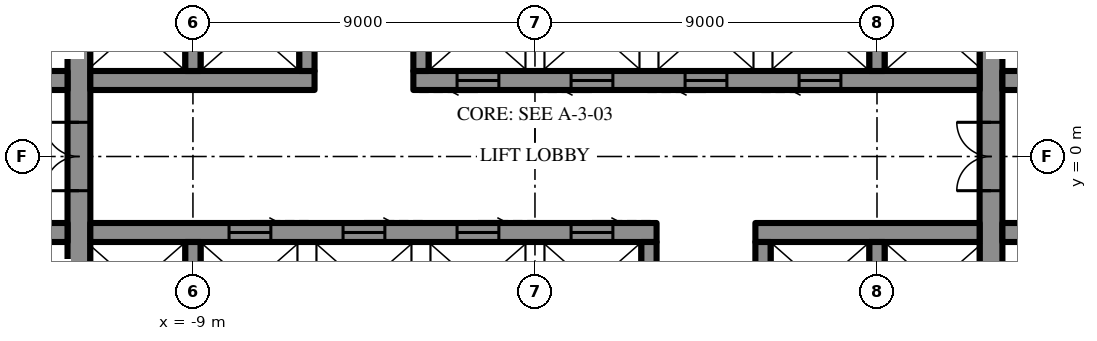
"""IFC4 building model, lengths in metres.
Left out: names, types, materials, properties, quantities, classifications, styles, units other than length and angle.
Written with IfcOpenShell. Run it as: python <this file> out.ifc"""

import sys

from ifc_helpers import new_model, si_unit, direction, frame, frame_2d, origin, place, context, subcontext, project, spatial, rectangle, extrude, element, fill, save


model = new_model("IFC4")
c1 = context("Model", 3, precision=1e-05, world=origin(), true_north=direction((0.0, 1.0)))
c2 = subcontext(c1, "Body", "Model", "MODEL_VIEW")
j1 = project(units=[si_unit("LENGTHUNIT", "METRE"), si_unit("PLANEANGLEUNIT", "RADIAN")], contexts=[c1])
p1 = place(None, origin())
s1 = spatial("IfcSite", under=j1, at=p1, CompositionType="ELEMENT")
p2 = place(p1, origin())
s2 = spatial("IfcBuilding", under=s1, at=p2, CompositionType="ELEMENT")
p3 = place(p2, frame((0.0, 0.0, 291.1)))
s3 = spatial("IfcBuildingStorey", under=s2, at=p3, CompositionType="ELEMENT", Elevation=291.1)
p4 = place(p3, frame((12.0, -10.7, 0.0), z_axis=(0.0, 0.0, 1.0), x_axis=(0.0, 1.0, 0.0)))
e1 = element("IfcWall", 1, at=p4, inside=s3, PredefinedType="SHEAR", context=c2, shape_type="SweptSolid", body=[
    extrude(rectangle(XDim=21.4, YDim=0.6, at=frame_2d((10.7, 0.0))), origin(), (0.0, 0.0, 1.0), 4.2),
])
p5 = place(p4, frame((9.8, 0.0, 0.0)))
e2 = element("IfcOpeningElement", 2, at=p5, cuts=e1, PredefinedType="OPENING", context=c2, shape_type="SweptSolid", body=[
    extrude(rectangle(XDim=1.8, YDim=2.4, at=frame_2d((0.9, 1.2))), frame((0.0, 0.31, 0.0), z_axis=(0.0, -1.0, 0.0), x_axis=(1.0, 0.0, 0.0)), (0.0, 0.0, 1.0), 0.62),
])
p6 = place(p3, frame((-12.0, -10.7, 0.0), z_axis=(0.0, 0.0, 1.0), x_axis=(0.0, 1.0, 0.0)))
e3 = element("IfcWall", 3, at=p6, inside=s3, PredefinedType="SHEAR", context=c2, shape_type="SweptSolid", body=[
    extrude(rectangle(XDim=21.4, YDim=0.6, at=frame_2d((10.7, 0.0))), origin(), (0.0, 0.0, 1.0), 4.2),
])
p7 = place(p6, frame((9.8, 0.0, 0.0)))
e4 = element("IfcOpeningElement", 4, at=p7, cuts=e3, PredefinedType="OPENING", context=c2, shape_type="SweptSolid", body=[
    extrude(rectangle(XDim=1.8, YDim=2.4, at=frame_2d((0.9, 1.2))), frame((0.0, 0.31, 0.0), z_axis=(0.0, -1.0, 0.0), x_axis=(1.0, 0.0, 0.0)), (0.0, 0.0, 1.0), 0.62),
])
p8 = place(p3, frame((-14.5, 2.0, 0.0), z_axis=(0.0, 0.0, 1.0), x_axis=(1.0, 0.0, 0.0)))
e5 = element("IfcWall", 5, at=p8, inside=s3, PredefinedType="SHEAR", context=c2, shape_type="SweptSolid", body=[
    extrude(rectangle(XDim=2.2, YDim=0.5, at=frame_2d((1.1, 0.0))), origin(), (0.0, 0.0, 1.0), 4.2),
])
p9 = place(p8, frame((0.5, 0.0, 0.0)))
e6 = element("IfcOpeningElement", 6, at=p9, cuts=e5, PredefinedType="OPENING", context=c2, shape_type="SweptSolid", body=[
    extrude(rectangle(XDim=0.9, YDim=2.2, at=frame_2d((0.45, 1.1))), frame((0.0, 0.26, 0.0), z_axis=(0.0, -1.0, 0.0), x_axis=(1.0, 0.0, 0.0)), (0.0, 0.0, 1.0), 0.52),
])
p10 = place(p3, frame((-11.7, 2.0, 0.0), z_axis=(0.0, 0.0, 1.0), x_axis=(1.0, 0.0, 0.0)))
e7 = element("IfcWall", 7, at=p10, inside=s3, PredefinedType="SHEAR", context=c2, shape_type="SweptSolid", body=[
    extrude(rectangle(XDim=5.9, YDim=0.5, at=frame_2d((2.95, 0.0))), origin(), (0.0, 0.0, 1.0), 4.2),
])
p11 = place(p3, frame((-3.2, 2.0, 0.0), z_axis=(0.0, 0.0, 1.0), x_axis=(1.0, 0.0, 0.0)))
e8 = element("IfcWall", 8, at=p11, inside=s3, PredefinedType="SHEAR", context=c2, shape_type="SweptSolid", body=[
    extrude(rectangle(XDim=14.9, YDim=0.5, at=frame_2d((7.45, 0.0))), origin(), (0.0, 0.0, 1.0), 4.2),
])
p12 = place(p11, frame((1.15, 0.0, 0.0)))
e9 = element("IfcOpeningElement", 9, at=p12, cuts=e8, PredefinedType="OPENING", context=c2, shape_type="SweptSolid", body=[
    extrude(rectangle(XDim=1.1, YDim=2.2, at=frame_2d((0.55, 1.1))), frame((0.0, 0.26, 0.0), z_axis=(0.0, -1.0, 0.0), x_axis=(1.0, 0.0, 0.0)), (0.0, 0.0, 1.0), 0.52),
])
p13 = place(p11, frame((4.15, 0.0, 0.0)))
e10 = element("IfcOpeningElement", 10, at=p13, cuts=e8, PredefinedType="OPENING", context=c2, shape_type="SweptSolid", body=[
    extrude(rectangle(XDim=1.1, YDim=2.2, at=frame_2d((0.55, 1.1))), frame((0.0, 0.26, 0.0), z_axis=(0.0, -1.0, 0.0), x_axis=(1.0, 0.0, 0.0)), (0.0, 0.0, 1.0), 0.52),
])
p14 = place(p11, frame((7.15, 0.0, 0.0)))
e11 = element("IfcOpeningElement", 11, at=p14, cuts=e8, PredefinedType="OPENING", context=c2, shape_type="SweptSolid", body=[
    extrude(rectangle(XDim=1.1, YDim=2.2, at=frame_2d((0.55, 1.1))), frame((0.0, 0.26, 0.0), z_axis=(0.0, -1.0, 0.0), x_axis=(1.0, 0.0, 0.0)), (0.0, 0.0, 1.0), 0.52),
])
p15 = place(p11, frame((10.15, 0.0, 0.0)))
e12 = element("IfcOpeningElement", 12, at=p15, cuts=e8, PredefinedType="OPENING", context=c2, shape_type="SweptSolid", body=[
    extrude(rectangle(XDim=1.1, YDim=2.2, at=frame_2d((0.55, 1.1))), frame((0.0, 0.26, 0.0), z_axis=(0.0, -1.0, 0.0), x_axis=(1.0, 0.0, 0.0)), (0.0, 0.0, 1.0), 0.52),
])
p16 = place(p3, frame((12.3, 2.0, 0.0), z_axis=(0.0, 0.0, 1.0), x_axis=(1.0, 0.0, 0.0)))
e13 = element("IfcWall", 13, at=p16, inside=s3, PredefinedType="SHEAR", context=c2, shape_type="SweptSolid", body=[
    extrude(rectangle(XDim=2.2, YDim=0.5, at=frame_2d((1.1, 0.0))), origin(), (0.0, 0.0, 1.0), 4.2),
])
p17 = place(p16, frame((0.8, 0.0, 0.0)))
e14 = element("IfcOpeningElement", 14, at=p17, cuts=e13, PredefinedType="OPENING", context=c2, shape_type="SweptSolid", body=[
    extrude(rectangle(XDim=0.9, YDim=2.2, at=frame_2d((0.45, 1.1))), frame((0.0, 0.26, 0.0), z_axis=(0.0, -1.0, 0.0), x_axis=(1.0, 0.0, 0.0)), (0.0, 0.0, 1.0), 0.52),
])
for number, where, z_axis, x_axis in (
    (15, (-9.0, 2.25, 0.0), (0.0, 0.0, 1.0), (0.0, 1.0, 0.0)),
    (16, (-6.0, 2.25, 0.0), (0.0, 0.0, 1.0), (0.0, 1.0, 0.0)),
    (17, (-3.0, 2.25, 0.0), (0.0, 0.0, 1.0), (0.0, 1.0, 0.0)),
    (18, (9.0, 2.25, 0.0), (0.0, 0.0, 1.0), (0.0, 1.0, 0.0)),
):
    element("IfcWall", number, at=place(p3, frame(where, z_axis=z_axis, x_axis=x_axis)), inside=s3, PredefinedType="SHEAR", context=c2, shape_type="SweptSolid", body=[
        extrude(rectangle(XDim=2.3, YDim=0.4, at=frame_2d((1.15, 0.0))), origin(), (0.0, 0.0, 1.0), 4.2),
    ])
p18 = place(p3, frame((14.5, -2.0, 0.0), z_axis=(0.0, 0.0, 1.0), x_axis=(-1.0, 0.0, 0.0)))
e19 = element("IfcWall", 19, at=p18, inside=s3, PredefinedType="SHEAR", context=c2, shape_type="SweptSolid", body=[
    extrude(rectangle(XDim=2.2, YDim=0.5, at=frame_2d((1.1, 0.0))), origin(), (0.0, 0.0, 1.0), 4.2),
])
p19 = place(p18, frame((0.5, 0.0, 0.0)))
e20 = element("IfcOpeningElement", 20, at=p19, cuts=e19, PredefinedType="OPENING", context=c2, shape_type="SweptSolid", body=[
    extrude(rectangle(XDim=0.9, YDim=2.2, at=frame_2d((0.45, 1.1))), frame((0.0, 0.26, 0.0), z_axis=(0.0, -1.0, 0.0), x_axis=(1.0, 0.0, 0.0)), (0.0, 0.0, 1.0), 0.52),
])
p20 = place(p3, frame((11.7, -2.0, 0.0), z_axis=(0.0, 0.0, 1.0), x_axis=(-1.0, 0.0, 0.0)))
e21 = element("IfcWall", 21, at=p20, inside=s3, PredefinedType="SHEAR", context=c2, shape_type="SweptSolid", body=[
    extrude(rectangle(XDim=5.9, YDim=0.5, at=frame_2d((2.95, 0.0))), origin(), (0.0, 0.0, 1.0), 4.2),
])
p21 = place(p3, frame((3.2, -2.0, 0.0), z_axis=(0.0, 0.0, 1.0), x_axis=(-1.0, 0.0, 0.0)))
e22 = element("IfcWall", 22, at=p21, inside=s3, PredefinedType="SHEAR", context=c2, shape_type="SweptSolid", body=[
    extrude(rectangle(XDim=14.9, YDim=0.5, at=frame_2d((7.45, 0.0))), origin(), (0.0, 0.0, 1.0), 4.2),
])
p22 = place(p21, frame((1.15, 0.0, 0.0)))
e23 = element("IfcOpeningElement", 23, at=p22, cuts=e22, PredefinedType="OPENING", context=c2, shape_type="SweptSolid", body=[
    extrude(rectangle(XDim=1.1, YDim=2.2, at=frame_2d((0.55, 1.1))), frame((0.0, 0.26, 0.0), z_axis=(0.0, -1.0, 0.0), x_axis=(1.0, 0.0, 0.0)), (0.0, 0.0, 1.0), 0.52),
])
p23 = place(p21, frame((4.15, 0.0, 0.0)))
e24 = element("IfcOpeningElement", 24, at=p23, cuts=e22, PredefinedType="OPENING", context=c2, shape_type="SweptSolid", body=[
    extrude(rectangle(XDim=1.1, YDim=2.2, at=frame_2d((0.55, 1.1))), frame((0.0, 0.26, 0.0), z_axis=(0.0, -1.0, 0.0), x_axis=(1.0, 0.0, 0.0)), (0.0, 0.0, 1.0), 0.52),
])
p24 = place(p21, frame((7.15, 0.0, 0.0)))
e25 = element("IfcOpeningElement", 25, at=p24, cuts=e22, PredefinedType="OPENING", context=c2, shape_type="SweptSolid", body=[
    extrude(rectangle(XDim=1.1, YDim=2.2, at=frame_2d((0.55, 1.1))), frame((0.0, 0.26, 0.0), z_axis=(0.0, -1.0, 0.0), x_axis=(1.0, 0.0, 0.0)), (0.0, 0.0, 1.0), 0.52),
])
p25 = place(p21, frame((10.15, 0.0, 0.0)))
e26 = element("IfcOpeningElement", 26, at=p25, cuts=e22, PredefinedType="OPENING", context=c2, shape_type="SweptSolid", body=[
    extrude(rectangle(XDim=1.1, YDim=2.2, at=frame_2d((0.55, 1.1))), frame((0.0, 0.26, 0.0), z_axis=(0.0, -1.0, 0.0), x_axis=(1.0, 0.0, 0.0)), (0.0, 0.0, 1.0), 0.52),
])
p26 = place(p3, frame((-12.3, -2.0, 0.0), z_axis=(0.0, 0.0, 1.0), x_axis=(-1.0, 0.0, 0.0)))
e27 = element("IfcWall", 27, at=p26, inside=s3, PredefinedType="SHEAR", context=c2, shape_type="SweptSolid", body=[
    extrude(rectangle(XDim=2.2, YDim=0.5, at=frame_2d((1.1, 0.0))), origin(), (0.0, 0.0, 1.0), 4.2),
])
p27 = place(p26, frame((0.8, 0.0, 0.0)))
e28 = element("IfcOpeningElement", 28, at=p27, cuts=e27, PredefinedType="OPENING", context=c2, shape_type="SweptSolid", body=[
    extrude(rectangle(XDim=0.9, YDim=2.2, at=frame_2d((0.45, 1.1))), frame((0.0, 0.26, 0.0), z_axis=(0.0, -1.0, 0.0), x_axis=(1.0, 0.0, 0.0)), (0.0, 0.0, 1.0), 0.52),
])
for number, where, z_axis, x_axis in (
    (29, (9.0, -2.25, 0.0), (0.0, 0.0, 1.0), (0.0, -1.0, 0.0)),
    (30, (6.0, -2.25, 0.0), (0.0, 0.0, 1.0), (0.0, -1.0, 0.0)),
    (31, (3.0, -2.25, 0.0), (0.0, 0.0, 1.0), (0.0, -1.0, 0.0)),
    (32, (-9.0, -2.25, 0.0), (0.0, 0.0, 1.0), (0.0, -1.0, 0.0)),
):
    element("IfcWall", number, at=place(p3, frame(where, z_axis=z_axis, x_axis=x_axis)), inside=s3, PredefinedType="SHEAR", context=c2, shape_type="SweptSolid", body=[
        extrude(rectangle(XDim=2.3, YDim=0.4, at=frame_2d((1.15, 0.0))), origin(), (0.0, 0.0, 1.0), 4.2),
    ])
p28 = place(p5, origin())
e33 = element("IfcDoor", 33, at=p28, inside=s3, OperationType="DOUBLE_DOOR_SINGLE_SWING", PredefinedType="DOOR", context=c2, shape_type="SweptSolid", body=[
    extrude(rectangle(XDim=1.8, YDim=2.4, at=frame_2d((0.9, 1.2))), frame((0.0, 0.025, 0.0), z_axis=(0.0, -1.0, 0.0), x_axis=(1.0, 0.0, 0.0)), (0.0, 0.0, 1.0), 0.05),
])
fill(e2, e33)
p29 = place(p7, origin())
e34 = element("IfcDoor", 34, at=p29, inside=s3, OperationType="DOUBLE_DOOR_SINGLE_SWING", PredefinedType="DOOR", context=c2, shape_type="SweptSolid", body=[
    extrude(rectangle(XDim=1.8, YDim=2.4, at=frame_2d((0.9, 1.2))), frame((0.0, 0.025, 0.0), z_axis=(0.0, -1.0, 0.0), x_axis=(1.0, 0.0, 0.0)), (0.0, 0.0, 1.0), 0.05),
])
fill(e4, e34)
p30 = place(p12, frame((1.1, 0.0, 0.0), z_axis=(0.0, 0.0, 1.0), x_axis=(-1.0, 0.0, 0.0)))
e35 = element("IfcDoor", 35, at=p30, inside=s3, OperationType="SLIDING_TO_LEFT", PredefinedType="DOOR", context=c2, shape_type="SweptSolid", body=[
    extrude(rectangle(XDim=1.1, YDim=2.2, at=frame_2d((0.55, 1.1))), frame((0.0, 0.025, 0.0), z_axis=(0.0, -1.0, 0.0), x_axis=(1.0, 0.0, 0.0)), (0.0, 0.0, 1.0), 0.05),
])
fill(e9, e35)
p31 = place(p13, frame((1.1, 0.0, 0.0), z_axis=(0.0, 0.0, 1.0), x_axis=(-1.0, 0.0, 0.0)))
e36 = element("IfcDoor", 36, at=p31, inside=s3, OperationType="SLIDING_TO_LEFT", PredefinedType="DOOR", context=c2, shape_type="SweptSolid", body=[
    extrude(rectangle(XDim=1.1, YDim=2.2, at=frame_2d((0.55, 1.1))), frame((0.0, 0.025, 0.0), z_axis=(0.0, -1.0, 0.0), x_axis=(1.0, 0.0, 0.0)), (0.0, 0.0, 1.0), 0.05),
])
fill(e10, e36)
p32 = place(p14, frame((1.1, 0.0, 0.0), z_axis=(0.0, 0.0, 1.0), x_axis=(-1.0, 0.0, 0.0)))
e37 = element("IfcDoor", 37, at=p32, inside=s3, OperationType="SLIDING_TO_LEFT", PredefinedType="DOOR", context=c2, shape_type="SweptSolid", body=[
    extrude(rectangle(XDim=1.1, YDim=2.2, at=frame_2d((0.55, 1.1))), frame((0.0, 0.025, 0.0), z_axis=(0.0, -1.0, 0.0), x_axis=(1.0, 0.0, 0.0)), (0.0, 0.0, 1.0), 0.05),
])
fill(e11, e37)
p33 = place(p15, frame((1.1, 0.0, 0.0), z_axis=(0.0, 0.0, 1.0), x_axis=(-1.0, 0.0, 0.0)))
e38 = element("IfcDoor", 38, at=p33, inside=s3, OperationType="SLIDING_TO_LEFT", PredefinedType="DOOR", context=c2, shape_type="SweptSolid", body=[
    extrude(rectangle(XDim=1.1, YDim=2.2, at=frame_2d((0.55, 1.1))), frame((0.0, 0.025, 0.0), z_axis=(0.0, -1.0, 0.0), x_axis=(1.0, 0.0, 0.0)), (0.0, 0.0, 1.0), 0.05),
])
fill(e12, e38)
p34 = place(p22, frame((1.1, 0.0, 0.0), z_axis=(0.0, 0.0, 1.0), x_axis=(-1.0, 0.0, 0.0)))
e39 = element("IfcDoor", 39, at=p34, inside=s3, OperationType="SLIDING_TO_LEFT", PredefinedType="DOOR", context=c2, shape_type="SweptSolid", body=[
    extrude(rectangle(XDim=1.1, YDim=2.2, at=frame_2d((0.55, 1.1))), frame((0.0, 0.025, 0.0), z_axis=(0.0, -1.0, 0.0), x_axis=(1.0, 0.0, 0.0)), (0.0, 0.0, 1.0), 0.05),
])
fill(e23, e39)
p35 = place(p23, frame((1.1, 0.0, 0.0), z_axis=(0.0, 0.0, 1.0), x_axis=(-1.0, 0.0, 0.0)))
e40 = element("IfcDoor", 40, at=p35, inside=s3, OperationType="SLIDING_TO_LEFT", PredefinedType="DOOR", context=c2, shape_type="SweptSolid", body=[
    extrude(rectangle(XDim=1.1, YDim=2.2, at=frame_2d((0.55, 1.1))), frame((0.0, 0.025, 0.0), z_axis=(0.0, -1.0, 0.0), x_axis=(1.0, 0.0, 0.0)), (0.0, 0.0, 1.0), 0.05),
])
fill(e24, e40)
p36 = place(p24, frame((1.1, 0.0, 0.0), z_axis=(0.0, 0.0, 1.0), x_axis=(-1.0, 0.0, 0.0)))
e41 = element("IfcDoor", 41, at=p36, inside=s3, OperationType="SLIDING_TO_LEFT", PredefinedType="DOOR", context=c2, shape_type="SweptSolid", body=[
    extrude(rectangle(XDim=1.1, YDim=2.2, at=frame_2d((0.55, 1.1))), frame((0.0, 0.025, 0.0), z_axis=(0.0, -1.0, 0.0), x_axis=(1.0, 0.0, 0.0)), (0.0, 0.0, 1.0), 0.05),
])
fill(e25, e41)
p37 = place(p25, frame((1.1, 0.0, 0.0), z_axis=(0.0, 0.0, 1.0), x_axis=(-1.0, 0.0, 0.0)))
e42 = element("IfcDoor", 42, at=p37, inside=s3, OperationType="SLIDING_TO_LEFT", PredefinedType="DOOR", context=c2, shape_type="SweptSolid", body=[
    extrude(rectangle(XDim=1.1, YDim=2.2, at=frame_2d((0.55, 1.1))), frame((0.0, 0.025, 0.0), z_axis=(0.0, -1.0, 0.0), x_axis=(1.0, 0.0, 0.0)), (0.0, 0.0, 1.0), 0.05),
])
fill(e26, e42)
save(model, sys.argv[1])
